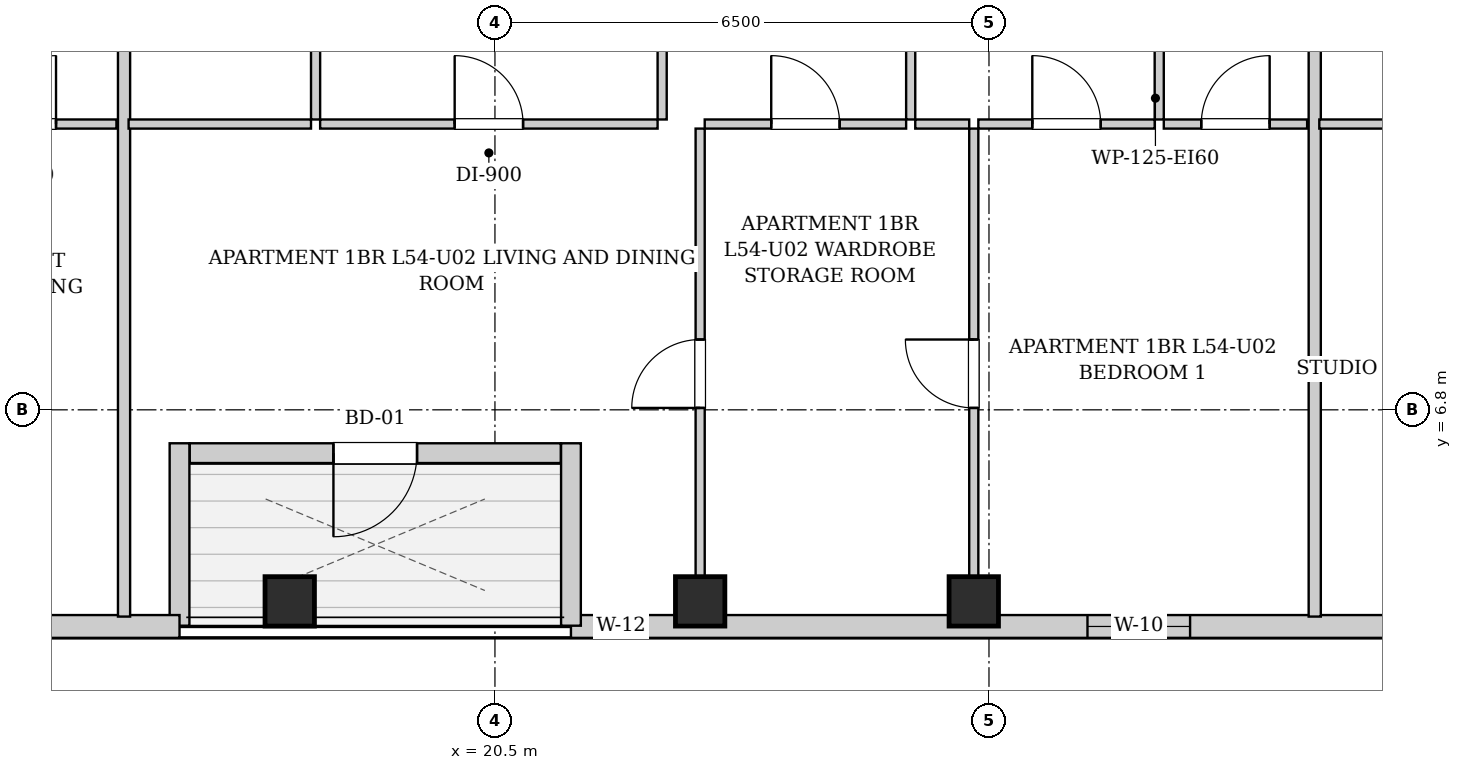
"""IFC4 building model, lengths in metres.
Left out: names, types, materials, properties, quantities, classifications, styles, units other than length and angle.
Written with IfcOpenShell. Run it as: python <this file> out.ifc"""

import sys

from ifc_helpers import new_model, si_unit, direction, frame, frame_2d, origin, origin_2d, place, context, subcontext, project, spatial, rectangle, extrude, element, fill, save


model = new_model("IFC4")
c1 = context("Model", 3, precision=1e-05, world=origin(), true_north=direction((0.0, 1.0)))
c2 = subcontext(c1, "Body", "Model", "MODEL_VIEW")
j1 = project(units=[si_unit("LENGTHUNIT", "METRE"), si_unit("PLANEANGLEUNIT", "RADIAN")], contexts=[c1])
p1 = place(None, origin())
s1 = spatial("IfcSite", under=j1, at=p1, CompositionType="ELEMENT")
p2 = place(p1, origin())
s2 = spatial("IfcBuilding", under=s1, at=p2, CompositionType="ELEMENT")
p3 = place(p2, frame((0.0, 0.0, 187.6)))
s3 = spatial("IfcBuildingStorey", under=s2, at=p3, CompositionType="ELEMENT", Elevation=187.6)
for number, where, z_axis, x_axis in (
    (1, (17.8, 4.28, 0.0), (0.0, 0.0, 1.0), (1.0, 0.0, 0.0)),
    (2, (23.2, 4.28, 0.0), (0.0, 0.0, 1.0), (1.0, 0.0, 0.0)),
    (3, (26.8, 4.28, 0.0), (0.0, 0.0, 1.0), (1.0, 0.0, 0.0)),
):
    element("IfcColumn", number, at=place(p3, frame(where, z_axis=z_axis, x_axis=x_axis)), inside=s3, PredefinedType="COLUMN", context=c2, shape_type="SweptSolid", body=[
        extrude(rectangle(XDim=0.65, YDim=0.65, at=origin_2d()), origin(), (0.0, 0.0, 1.0), 3.3),
    ])
p4 = place(p3, frame((37.8, 3.95, 0.0), z_axis=(0.0, 0.0, 1.0), x_axis=(-1.0, 0.0, 0.0)))
e4 = element("IfcWall", 4, at=p4, inside=s3, PredefinedType="SOLIDWALL", context=c2, shape_type="SweptSolid", body=[
    extrude(rectangle(XDim=16.3, YDim=0.3, at=frame_2d((8.15, 0.0))), origin(), (0.0, 0.0, 1.0), 3.04),
])
p5 = place(p4, frame((15.3, 0.0, 0.55)))
e5 = element("IfcOpeningElement", 5, at=p5, cuts=e4, PredefinedType="OPENING", context=c2, shape_type="SweptSolid", body=[
    extrude(rectangle(XDim=0.68, YDim=1.2, at=frame_2d((0.34, 0.6))), frame((0.0, 0.16, 0.0), z_axis=(0.0, -1.0, 0.0), x_axis=(1.0, 0.0, 0.0)), (0.0, 0.0, 1.0), 0.32),
])
p6 = place(p4, frame((8.154, 0.0, 0.55)))
e6 = element("IfcOpeningElement", 6, at=p6, cuts=e4, PredefinedType="OPENING", context=c2, shape_type="SweptSolid", body=[
    extrude(rectangle(XDim=1.35, YDim=1.2, at=frame_2d((0.675, 0.6))), frame((0.0, 0.16, 0.0), z_axis=(0.0, -1.0, 0.0), x_axis=(1.0, 0.0, 0.0)), (0.0, 0.0, 1.0), 0.32),
])
p7 = place(p4, frame((2.721, 0.0, 0.55)))
e7 = element("IfcOpeningElement", 7, at=p7, cuts=e4, PredefinedType="OPENING", context=c2, shape_type="SweptSolid", body=[
    extrude(rectangle(XDim=1.35, YDim=1.2, at=frame_2d((0.675, 0.6))), frame((0.0, 0.16, 0.0), z_axis=(0.0, -1.0, 0.0), x_axis=(1.0, 0.0, 0.0)), (0.0, 0.0, 1.0), 0.32),
])
p8 = place(p4, frame((1.035, 0.0, 0.55)))
e8 = element("IfcOpeningElement", 8, at=p8, cuts=e4, PredefinedType="OPENING", context=c2, shape_type="SweptSolid", body=[
    extrude(rectangle(XDim=1.35, YDim=1.2, at=frame_2d((0.675, 0.6))), frame((0.0, 0.16, 0.0), z_axis=(0.0, -1.0, 0.0), x_axis=(1.0, 0.0, 0.0)), (0.0, 0.0, 1.0), 0.32),
])
p9 = place(p3, frame((21.5, 3.96, 0.0), z_axis=(0.0, 0.0, 1.0), x_axis=(0.0, 1.0, 0.0)))
e9 = element("IfcWall", 9, at=p9, inside=s3, PredefinedType="SOLIDWALL", context=c2, shape_type="SweptSolid", body=[
    extrude(rectangle(XDim=2.4, YDim=0.26, at=frame_2d((1.2, 0.0))), origin(), (0.0, 0.0, 1.0), 3.04),
])
p10 = place(p3, frame((21.366, 6.23, 0.0), z_axis=(0.0, 0.0, 1.0), x_axis=(-1.0, 0.0, 0.0)))
e10 = element("IfcWall", 10, at=p10, inside=s3, PredefinedType="SOLIDWALL", context=c2, shape_type="SweptSolid", body=[
    extrude(rectangle(XDim=4.882, YDim=0.26, at=frame_2d((2.441, 0.0))), origin(), (0.0, 0.0, 1.0), 3.04),
])
p11 = place(p10, frame((1.891, 0.0, 0.0)))
e11 = element("IfcOpeningElement", 11, at=p11, cuts=e10, PredefinedType="OPENING", context=c2, shape_type="SweptSolid", body=[
    extrude(rectangle(XDim=1.1, YDim=2.0, at=frame_2d((0.55, 1.0))), frame((0.0, 0.14, 0.0), z_axis=(0.0, -1.0, 0.0), x_axis=(1.0, 0.0, 0.0)), (0.0, 0.0, 1.0), 0.28),
])
p12 = place(p3, frame((16.35, 6.36, 0.0), z_axis=(0.0, 0.0, 1.0), x_axis=(0.0, -1.0, 0.0)))
e12 = element("IfcWall", 12, at=p12, inside=s3, PredefinedType="SOLIDWALL", context=c2, shape_type="SweptSolid", body=[
    extrude(rectangle(XDim=2.4, YDim=0.26, at=frame_2d((1.2, 0.0))), origin(), (0.0, 0.0, 1.0), 3.04),
])
p13 = place(p3, frame((16.35, 3.95, 0.0), z_axis=(0.0, 0.0, 1.0), x_axis=(-1.0, 0.0, 0.0)))
e13 = element("IfcWall", 13, at=p13, inside=s3, PredefinedType="SOLIDWALL", context=c2, shape_type="SweptSolid", body=[
    extrude(rectangle(XDim=3.25, YDim=0.3, at=frame_2d((1.625, 0.0))), origin(), (0.0, 0.0, 1.0), 3.04),
])
p14 = place(p3, frame((13.03, 10.56, 0.0), z_axis=(0.0, 0.0, 1.0), x_axis=(1.0, 0.0, 0.0)))
e14 = element("IfcWall", 14, at=p14, inside=s3, PredefinedType="PARTITIONING", context=c2, shape_type="SweptSolid", body=[
    extrude(rectangle(XDim=2.49, YDim=0.12, at=frame_2d((1.245, 0.0))), origin(), (0.0, 0.0, 1.0), 3.04),
])
p15 = place(p14, frame((0.795, 0.0, 0.0)))
e15 = element("IfcOpeningElement", 15, at=p15, cuts=e14, PredefinedType="OPENING", context=c2, shape_type="SweptSolid", body=[
    extrude(rectangle(XDim=0.9, YDim=2.05, at=frame_2d((0.45, 1.025))), frame((0.0, 0.07, 0.0), z_axis=(0.0, -1.0, 0.0), x_axis=(1.0, 0.0, 0.0)), (0.0, 0.0, 1.0), 0.14),
])
p16 = place(p3, frame((15.62, 4.08, 0.0), z_axis=(0.0, 0.0, 1.0), x_axis=(0.0, 1.0, 0.0)))
e16 = element("IfcWall", 16, at=p16, inside=s3, PredefinedType="PARTITIONING", context=c2, shape_type="SweptSolid", body=[
    extrude(rectangle(XDim=9.39, YDim=0.16, at=frame_2d((4.695, 0.0))), origin(), (0.0, 0.0, 1.0), 3.04),
])
p17 = place(p3, frame((18.14, 10.62, 0.0), z_axis=(0.0, 0.0, 1.0), x_axis=(0.0, 1.0, 0.0)))
e17 = element("IfcWall", 17, at=p17, inside=s3, PredefinedType="PARTITIONING", context=c2, shape_type="SweptSolid", body=[
    extrude(rectangle(XDim=2.85, YDim=0.12, at=frame_2d((1.425, 0.0))), origin(), (0.0, 0.0, 1.0), 3.04),
])
p18 = place(p17, frame((0.995, 0.0, 0.0)))
e18 = element("IfcOpeningElement", 18, at=p18, cuts=e17, PredefinedType="OPENING", context=c2, shape_type="SweptSolid", body=[
    extrude(rectangle(XDim=0.86, YDim=2.05, at=frame_2d((0.43, 1.025))), frame((0.0, 0.07, 0.0), z_axis=(0.0, -1.0, 0.0), x_axis=(1.0, 0.0, 0.0)), (0.0, 0.0, 1.0), 0.14),
])
p19 = place(p3, frame((15.68, 10.56, 0.0), z_axis=(0.0, 0.0, 1.0), x_axis=(1.0, 0.0, 0.0)))
e19 = element("IfcWall", 19, at=p19, inside=s3, PredefinedType="PARTITIONING", context=c2, shape_type="SweptSolid", body=[
    extrude(rectangle(XDim=2.4, YDim=0.12, at=frame_2d((1.2, 0.0))), origin(), (0.0, 0.0, 1.0), 3.04),
])
p20 = place(p3, frame((22.7, 10.62, 0.0), z_axis=(0.0, 0.0, 1.0), x_axis=(0.0, 1.0, 0.0)))
e20 = element("IfcWall", 20, at=p20, inside=s3, PredefinedType="PARTITIONING", context=c2, shape_type="SweptSolid", body=[
    extrude(rectangle(XDim=2.85, YDim=0.12, at=frame_2d((1.425, 0.0))), origin(), (0.0, 0.0, 1.0), 3.04),
])
p21 = place(p20, frame((0.975, 0.0, 0.0)))
e21 = element("IfcOpeningElement", 21, at=p21, cuts=e20, PredefinedType="OPENING", context=c2, shape_type="SweptSolid", body=[
    extrude(rectangle(XDim=0.9, YDim=2.05, at=frame_2d((0.45, 1.025))), frame((0.0, 0.07, 0.0), z_axis=(0.0, -1.0, 0.0), x_axis=(1.0, 0.0, 0.0)), (0.0, 0.0, 1.0), 0.14),
])
p22 = place(p3, frame((18.2, 10.56, 0.0), z_axis=(0.0, 0.0, 1.0), x_axis=(1.0, 0.0, 0.0)))
e22 = element("IfcWall", 22, at=p22, inside=s3, PredefinedType="PARTITIONING", context=c2, shape_type="SweptSolid", body=[
    extrude(rectangle(XDim=4.44, YDim=0.12, at=frame_2d((2.22, 0.0))), origin(), (0.0, 0.0, 1.0), 3.04),
])
p23 = place(p22, frame((1.77, 0.0, 0.0)))
e23 = element("IfcOpeningElement", 23, at=p23, cuts=e22, PredefinedType="OPENING", context=c2, shape_type="SweptSolid", body=[
    extrude(rectangle(XDim=0.9, YDim=2.05, at=frame_2d((0.45, 1.025))), frame((0.0, 0.07, 0.0), z_axis=(0.0, -1.0, 0.0), x_axis=(1.0, 0.0, 0.0)), (0.0, 0.0, 1.0), 0.14),
])
p24 = place(p3, frame((25.97, 10.62, 0.0), z_axis=(0.0, 0.0, 1.0), x_axis=(0.0, 1.0, 0.0)))
e24 = element("IfcWall", 24, at=p24, inside=s3, PredefinedType="PARTITIONING", context=c2, shape_type="SweptSolid", body=[
    extrude(rectangle(XDim=2.85, YDim=0.12, at=frame_2d((1.425, 0.0))), origin(), (0.0, 0.0, 1.0), 3.04),
])
p25 = place(p24, frame((0.975, 0.0, 0.0)))
e25 = element("IfcOpeningElement", 25, at=p25, cuts=e24, PredefinedType="OPENING", context=c2, shape_type="SweptSolid", body=[
    extrude(rectangle(XDim=0.9, YDim=2.05, at=frame_2d((0.45, 1.025))), frame((0.0, 0.07, 0.0), z_axis=(0.0, -1.0, 0.0), x_axis=(1.0, 0.0, 0.0)), (0.0, 0.0, 1.0), 0.14),
])
p26 = place(p3, frame((23.26, 10.56, 0.0), z_axis=(0.0, 0.0, 1.0), x_axis=(1.0, 0.0, 0.0)))
e26 = element("IfcWall", 26, at=p26, inside=s3, PredefinedType="PARTITIONING", context=c2, shape_type="SweptSolid", body=[
    extrude(rectangle(XDim=2.65, YDim=0.12, at=frame_2d((1.325, 0.0))), origin(), (0.0, 0.0, 1.0), 3.04),
])
p27 = place(p26, frame((0.875, 0.0, 0.0)))
e27 = element("IfcOpeningElement", 27, at=p27, cuts=e26, PredefinedType="OPENING", context=c2, shape_type="SweptSolid", body=[
    extrude(rectangle(XDim=0.9, YDim=2.05, at=frame_2d((0.45, 1.025))), frame((0.0, 0.07, 0.0), z_axis=(0.0, -1.0, 0.0), x_axis=(1.0, 0.0, 0.0)), (0.0, 0.0, 1.0), 0.14),
])
p28 = place(p3, frame((29.24, 10.62, 0.0), z_axis=(0.0, 0.0, 1.0), x_axis=(0.0, 1.0, 0.0)))
e28 = element("IfcWall", 28, at=p28, inside=s3, PredefinedType="PARTITIONING", context=c2, shape_type="SweptSolid", body=[
    extrude(rectangle(XDim=2.85, YDim=0.12, at=frame_2d((1.425, 0.0))), origin(), (0.0, 0.0, 1.0), 3.04),
])
p29 = place(p28, frame((0.975, 0.0, 0.0)))
e29 = element("IfcOpeningElement", 29, at=p29, cuts=e28, PredefinedType="OPENING", context=c2, shape_type="SweptSolid", body=[
    extrude(rectangle(XDim=0.9, YDim=2.05, at=frame_2d((0.45, 1.025))), frame((0.0, 0.07, 0.0), z_axis=(0.0, -1.0, 0.0), x_axis=(1.0, 0.0, 0.0)), (0.0, 0.0, 1.0), 0.14),
])
p30 = place(p3, frame((26.03, 10.56, 0.0), z_axis=(0.0, 0.0, 1.0), x_axis=(1.0, 0.0, 0.0)))
e30 = element("IfcWall", 30, at=p30, inside=s3, PredefinedType="PARTITIONING", context=c2, shape_type="SweptSolid", body=[
    extrude(rectangle(XDim=0.71, YDim=0.12, at=frame_2d((0.355, 0.0))), origin(), (0.0, 0.0, 1.0), 3.04),
])
p31 = place(p3, frame((26.86, 10.56, 0.0), z_axis=(0.0, 0.0, 1.0), x_axis=(1.0, 0.0, 0.0)))
e31 = element("IfcWall", 31, at=p31, inside=s3, PredefinedType="PARTITIONING", context=c2, shape_type="SweptSolid", body=[
    extrude(rectangle(XDim=2.32, YDim=0.12, at=frame_2d((1.16, 0.0))), origin(), (0.0, 0.0, 1.0), 3.04),
])
p32 = place(p31, frame((0.71, 0.0, 0.0)))
e32 = element("IfcOpeningElement", 32, at=p32, cuts=e31, PredefinedType="OPENING", context=c2, shape_type="SweptSolid", body=[
    extrude(rectangle(XDim=0.9, YDim=2.05, at=frame_2d((0.45, 1.025))), frame((0.0, 0.07, 0.0), z_axis=(0.0, -1.0, 0.0), x_axis=(1.0, 0.0, 0.0)), (0.0, 0.0, 1.0), 0.14),
])
p33 = place(p3, frame((29.3, 10.56, 0.0), z_axis=(0.0, 0.0, 1.0), x_axis=(1.0, 0.0, 0.0)))
e33 = element("IfcWall", 33, at=p33, inside=s3, PredefinedType="PARTITIONING", context=c2, shape_type="SweptSolid", body=[
    extrude(rectangle(XDim=1.886, YDim=0.12, at=frame_2d((0.943, 0.0))), origin(), (0.0, 0.0, 1.0), 3.04),
])
p34 = place(p33, frame((0.493, 0.0, 0.0)))
e34 = element("IfcOpeningElement", 34, at=p34, cuts=e33, PredefinedType="OPENING", context=c2, shape_type="SweptSolid", body=[
    extrude(rectangle(XDim=0.9, YDim=2.05, at=frame_2d((0.45, 1.025))), frame((0.0, 0.07, 0.0), z_axis=(0.0, -1.0, 0.0), x_axis=(1.0, 0.0, 0.0)), (0.0, 0.0, 1.0), 0.14),
])
p35 = place(p3, frame((23.2, 4.08, 0.0), z_axis=(0.0, 0.0, 1.0), x_axis=(0.0, 1.0, 0.0)))
e35 = element("IfcWall", 35, at=p35, inside=s3, PredefinedType="PARTITIONING", context=c2, shape_type="SweptSolid", body=[
    extrude(rectangle(XDim=6.42, YDim=0.12, at=frame_2d((3.21, 0.0))), origin(), (0.0, 0.0, 1.0), 3.04),
])
p36 = place(p35, frame((2.745, 0.0, 0.0)))
e36 = element("IfcOpeningElement", 36, at=p36, cuts=e35, PredefinedType="OPENING", context=c2, shape_type="SweptSolid", body=[
    extrude(rectangle(XDim=0.9, YDim=2.05, at=frame_2d((0.45, 1.025))), frame((0.0, 0.07, 0.0), z_axis=(0.0, -1.0, 0.0), x_axis=(1.0, 0.0, 0.0)), (0.0, 0.0, 1.0), 0.14),
])
p37 = place(p3, frame((26.8, 4.08, 0.0), z_axis=(0.0, 0.0, 1.0), x_axis=(0.0, 1.0, 0.0)))
e37 = element("IfcWall", 37, at=p37, inside=s3, PredefinedType="PARTITIONING", context=c2, shape_type="SweptSolid", body=[
    extrude(rectangle(XDim=6.42, YDim=0.12, at=frame_2d((3.21, 0.0))), origin(), (0.0, 0.0, 1.0), 3.04),
])
p38 = place(p37, frame((2.745, 0.0, 0.0)))
e38 = element("IfcOpeningElement", 38, at=p38, cuts=e37, PredefinedType="OPENING", context=c2, shape_type="SweptSolid", body=[
    extrude(rectangle(XDim=0.9, YDim=2.05, at=frame_2d((0.45, 1.025))), frame((0.0, 0.07, 0.0), z_axis=(0.0, -1.0, 0.0), x_axis=(1.0, 0.0, 0.0)), (0.0, 0.0, 1.0), 0.14),
])
p39 = place(p3, frame((31.286, 4.08, 0.0), z_axis=(0.0, 0.0, 1.0), x_axis=(0.0, 1.0, 0.0)))
e39 = element("IfcWall", 39, at=p39, inside=s3, PredefinedType="PARTITIONING", context=c2, shape_type="SweptSolid", body=[
    extrude(rectangle(XDim=9.39, YDim=0.16, at=frame_2d((4.695, 0.0))), origin(), (0.0, 0.0, 1.0), 3.04),
])
p40 = place(p3, frame((31.346, 10.56, 0.0), z_axis=(0.0, 0.0, 1.0), x_axis=(1.0, 0.0, 0.0)))
e40 = element("IfcWall", 40, at=p40, inside=s3, PredefinedType="PARTITIONING", context=c2, shape_type="SweptSolid", body=[
    extrude(rectangle(XDim=1.912, YDim=0.12, at=frame_2d((0.956, 0.0))), origin(), (0.0, 0.0, 1.0), 3.04),
])
p41 = place(p15, origin())
e41 = element("IfcDoor", 41, at=p41, inside=s3, OperationType="SINGLE_SWING_RIGHT", PredefinedType="DOOR", context=c2, shape_type="SweptSolid", body=[
    extrude(rectangle(XDim=0.9, YDim=2.05, at=frame_2d((0.45, 1.025))), frame((0.0, 0.025, 0.0), z_axis=(0.0, -1.0, 0.0), x_axis=(1.0, 0.0, 0.0)), (0.0, 0.0, 1.0), 0.05),
])
fill(e15, e41)
p42 = place(p23, origin())
e42 = element("IfcDoor", 42, at=p42, inside=s3, OperationType="SINGLE_SWING_LEFT", PredefinedType="DOOR", context=c2, shape_type="SweptSolid", body=[
    extrude(rectangle(XDim=0.9, YDim=2.05, at=frame_2d((0.45, 1.025))), frame((0.0, 0.025, 0.0), z_axis=(0.0, -1.0, 0.0), x_axis=(1.0, 0.0, 0.0)), (0.0, 0.0, 1.0), 0.05),
])
fill(e23, e42)
p43 = place(p27, origin())
e43 = element("IfcDoor", 43, at=p43, inside=s3, OperationType="SINGLE_SWING_LEFT", PredefinedType="DOOR", context=c2, shape_type="SweptSolid", body=[
    extrude(rectangle(XDim=0.9, YDim=2.05, at=frame_2d((0.45, 1.025))), frame((0.0, 0.025, 0.0), z_axis=(0.0, -1.0, 0.0), x_axis=(1.0, 0.0, 0.0)), (0.0, 0.0, 1.0), 0.05),
])
fill(e27, e43)
p44 = place(p32, origin())
e44 = element("IfcDoor", 44, at=p44, inside=s3, OperationType="SINGLE_SWING_LEFT", PredefinedType="DOOR", context=c2, shape_type="SweptSolid", body=[
    extrude(rectangle(XDim=0.9, YDim=2.05, at=frame_2d((0.45, 1.025))), frame((0.0, 0.025, 0.0), z_axis=(0.0, -1.0, 0.0), x_axis=(1.0, 0.0, 0.0)), (0.0, 0.0, 1.0), 0.05),
])
fill(e32, e44)
p45 = place(p34, origin())
e45 = element("IfcDoor", 45, at=p45, inside=s3, OperationType="SINGLE_SWING_RIGHT", PredefinedType="DOOR", context=c2, shape_type="SweptSolid", body=[
    extrude(rectangle(XDim=0.9, YDim=2.05, at=frame_2d((0.45, 1.025))), frame((0.0, 0.025, 0.0), z_axis=(0.0, -1.0, 0.0), x_axis=(1.0, 0.0, 0.0)), (0.0, 0.0, 1.0), 0.05),
])
fill(e34, e45)
p46 = place(p36, origin())
e46 = element("IfcDoor", 46, at=p46, inside=s3, OperationType="SINGLE_SWING_LEFT", PredefinedType="DOOR", context=c2, shape_type="SweptSolid", body=[
    extrude(rectangle(XDim=0.9, YDim=2.05, at=frame_2d((0.45, 1.025))), frame((0.0, 0.025, 0.0), z_axis=(0.0, -1.0, 0.0), x_axis=(1.0, 0.0, 0.0)), (0.0, 0.0, 1.0), 0.05),
])
fill(e36, e46)
p47 = place(p38, origin())
e47 = element("IfcDoor", 47, at=p47, inside=s3, OperationType="SINGLE_SWING_RIGHT", PredefinedType="DOOR", context=c2, shape_type="SweptSolid", body=[
    extrude(rectangle(XDim=0.9, YDim=2.05, at=frame_2d((0.45, 1.025))), frame((0.0, 0.025, 0.0), z_axis=(0.0, -1.0, 0.0), x_axis=(1.0, 0.0, 0.0)), (0.0, 0.0, 1.0), 0.05),
])
fill(e38, e47)
p48 = place(p11, origin())
e48 = element("IfcDoor", 48, at=p48, inside=s3, OperationType="SINGLE_SWING_RIGHT", PredefinedType="DOOR", context=c2, shape_type="SweptSolid", body=[
    extrude(rectangle(XDim=1.1, YDim=2.0, at=frame_2d((0.55, 1.0))), frame((0.0, 0.025, 0.0), z_axis=(0.0, -1.0, 0.0), x_axis=(1.0, 0.0, 0.0)), (0.0, 0.0, 1.0), 0.05),
])
fill(e11, e48)
p49 = place(p5, origin())
e49 = element("IfcWindow", 49, at=p49, inside=s3, PartitioningType="SINGLE_PANEL", PredefinedType="WINDOW", context=c2, shape_type="SweptSolid", body=[
    extrude(rectangle(XDim=0.68, YDim=1.2, at=frame_2d((0.34, 0.6))), frame((0.0, 0.03, 0.0), z_axis=(0.0, -1.0, 0.0), x_axis=(1.0, 0.0, 0.0)), (0.0, 0.0, 1.0), 0.06),
])
fill(e5, e49)
p50 = place(p6, origin())
e50 = element("IfcWindow", 50, at=p50, inside=s3, PartitioningType="SINGLE_PANEL", PredefinedType="WINDOW", context=c2, shape_type="SweptSolid", body=[
    extrude(rectangle(XDim=1.35, YDim=1.2, at=frame_2d((0.675, 0.6))), frame((0.0, 0.03, 0.0), z_axis=(0.0, -1.0, 0.0), x_axis=(1.0, 0.0, 0.0)), (0.0, 0.0, 1.0), 0.06),
])
fill(e6, e50)
save(model, sys.argv[1])
